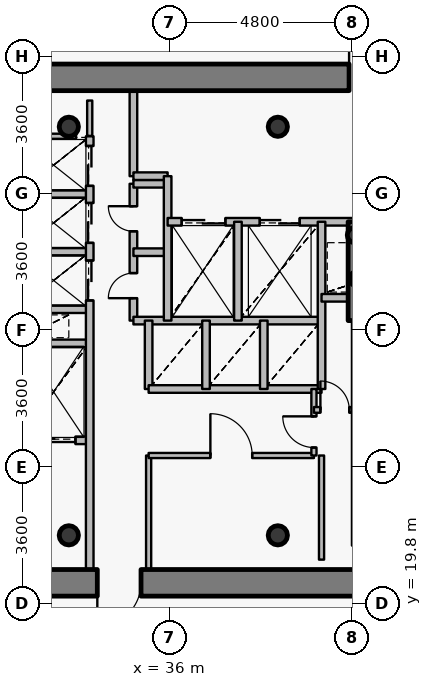
"""IFC4 building model, lengths in metres.
Left out: names, types, materials, properties, quantities, classifications, styles, units other than length and angle.
Written with IfcOpenShell. Run it as: python <this file> out.ifc"""

import sys

from ifc_helpers import new_model, si_unit, direction, frame, frame_2d, origin, origin_2d, place, context, subcontext, project, spatial, rectangle, hollow_circle, extrude, source, transform, mapped, element, fill, save


model = new_model("IFC4")
c1 = context("Model", 3, precision=1e-05, world=origin(), true_north=direction((0.0, 1.0)))
c2 = subcontext(c1, "Body", "Model", "MODEL_VIEW")
j1 = project(units=[si_unit("LENGTHUNIT", "METRE"), si_unit("PLANEANGLEUNIT", "RADIAN")], contexts=[c1])
p1 = place(None, origin())
s1 = spatial("IfcSite", under=j1, at=p1, CompositionType="ELEMENT")
p2 = place(p1, origin())
s2 = spatial("IfcBuilding", under=s1, at=p2, CompositionType="ELEMENT")
p3 = place(p2, frame((0.0, 0.0, 247.8)))
s3 = spatial("IfcBuildingStorey", under=s2, at=p3, CompositionType="ELEMENT", Elevation=247.8)
for number, where, z_axis, x_axis in (
    (1, (33.35, 21.6, 0.0), (0.0, 0.0, 1.0), (1.0, 0.0, 0.0)),
    (2, (38.85, 21.6, 0.0), (0.0, 0.0, 1.0), (1.0, 0.0, 0.0)),
    (3, (38.85, 32.35, 0.0), (0.0, 0.0, 1.0), (1.0, 0.0, 0.0)),
    (4, (33.35, 32.35, 0.0), (0.0, 0.0, 1.0), (1.0, 0.0, 0.0)),
):
    element("IfcColumn", number, at=place(p3, frame(where, z_axis=z_axis, x_axis=x_axis)), inside=s3, PredefinedType="COLUMN", context=c2, shape_type="SweptSolid", body=[
        extrude(hollow_circle(Radius=0.254, WallThickness=0.02, at=origin_2d()), origin(), (0.0, 0.0, 1.0), 3.75),
    ])
for number, where, z_axis, x_axis in (
    (5, (40.95, 28.35, 0.0), (0.0, 0.0, 1.0), (1.0, 0.0, 0.0)),
    (6, (40.88, 29.5, 0.0), (0.0, 0.0, 1.0), (1.0, 0.0, 0.0)),
):
    element("IfcColumn", number, at=place(p3, frame(where, z_axis=z_axis, x_axis=x_axis)), inside=s3, PredefinedType="COLUMN", context=c2, shape_type="SweptSolid", body=[
        extrude(hollow_circle(Radius=0.203, WallThickness=0.016, at=origin_2d()), origin(), (0.0, 0.0, 1.0), 3.75),
    ])
p4 = place(p3, frame((27.05, 33.65, 0.0), z_axis=(0.0, 0.0, 1.0), x_axis=(1.0, 0.0, 0.0)))
e7 = element("IfcWall", 7, at=p4, inside=s3, PredefinedType="SHEAR", context=c2, shape_type="SweptSolid", body=[
    extrude(rectangle(XDim=17.9, YDim=0.7, at=frame_2d((8.95, 0.0))), origin(), (0.0, 0.0, 1.0), 3.05),
])
p5 = place(p4, frame((13.675, 0.0, 0.0)))
e8 = element("IfcOpeningElement", 8, at=p5, cuts=e7, PredefinedType="OPENING", context=c2, shape_type="SweptSolid", body=[
    extrude(rectangle(XDim=1.15, YDim=2.15, at=origin_2d()), frame((0.575, 0.36, 1.075), z_axis=(0.0, -1.0, 0.0), x_axis=(1.0, 0.0, 0.0)), (0.0, 0.0, 1.0), 0.72),
])
p6 = place(p3, frame((44.95, 20.35, 0.0), z_axis=(0.0, 0.0, 1.0), x_axis=(-1.0, 0.0, 0.0)))
e9 = element("IfcWall", 9, at=p6, inside=s3, PredefinedType="SHEAR", context=c2, shape_type="SweptSolid", body=[
    extrude(rectangle(XDim=17.9, YDim=0.7, at=frame_2d((8.95, 0.0))), origin(), (0.0, 0.0, 1.0), 3.05),
])
p7 = place(p6, frame((9.7, 0.0, 0.0)))
e10 = element("IfcOpeningElement", 10, at=p7, cuts=e9, PredefinedType="OPENING", context=c2, shape_type="SweptSolid", body=[
    extrude(rectangle(XDim=1.15, YDim=2.15, at=origin_2d()), frame((0.575, 0.36, 1.075), z_axis=(0.0, -1.0, 0.0), x_axis=(1.0, 0.0, 0.0)), (0.0, 0.0, 1.0), 0.72),
])
p8 = place(p3, frame((40.9, 27.25, 0.0), z_axis=(0.0, 0.0, 1.0), x_axis=(0.0, 1.0, 0.0)))
e11 = element("IfcWall", 11, at=p8, inside=s3, PredefinedType="SHEAR", context=c2, shape_type="SweptSolid", body=[
    extrude(rectangle(XDim=2.6, YDim=0.4, at=frame_2d((1.3, 0.0))), origin(), (0.0, 0.0, 1.0), 3.1),
])
p9 = place(p3, frame((32.0, 24.1, 0.0), z_axis=(0.0, 0.0, 1.0), x_axis=(1.0, 0.0, 0.0)))
e12 = element("IfcWall", 12, at=p9, inside=s3, PredefinedType="PARTITIONING", context=c2, shape_type="SweptSolid", body=[
    extrude(rectangle(XDim=1.9, YDim=0.2, at=frame_2d((0.95, 0.0))), origin(), (0.0, 0.0, 1.0), 3.085),
])
p10 = place(p9, frame((0.375, 0.0, 0.0)))
e13 = element("IfcOpeningElement", 13, at=p10, cuts=e12, PredefinedType="OPENING", context=c2, shape_type="SweptSolid", body=[
    extrude(rectangle(XDim=1.15, YDim=2.15, at=origin_2d()), frame((0.575, 0.11, 1.075), z_axis=(0.0, -1.0, 0.0), x_axis=(1.0, 0.0, 0.0)), (0.0, 0.0, 1.0), 0.22),
])
for number, where, z_axis, x_axis in (
    (14, (32.0, 26.65, 0.0), (0.0, 0.0, 1.0), (1.0, 0.0, 0.0)),
    (15, (32.0, 27.55, 0.0), (0.0, 0.0, 1.0), (1.0, 0.0, 0.0)),
    (16, (32.0, 29.06, 0.0), (0.0, 0.0, 1.0), (1.0, 0.0, 0.0)),
    (17, (32.0, 30.58, 0.0), (0.0, 0.0, 1.0), (1.0, 0.0, 0.0)),
):
    element("IfcWall", number, at=place(p3, frame(where, z_axis=z_axis, x_axis=x_axis)), inside=s3, PredefinedType="PARTITIONING", context=c2, shape_type="SweptSolid", body=[
        extrude(rectangle(XDim=1.9, YDim=0.2, at=frame_2d((0.95, 0.0))), origin(), (0.0, 0.0, 1.0), 3.085),
    ])
p11 = place(p3, frame((33.9, 20.7, 0.0), z_axis=(0.0, 0.0, 1.0), x_axis=(0.0, 1.0, 0.0)))
e18 = element("IfcWall", 18, at=p11, inside=s3, PredefinedType="PARTITIONING", context=c2, shape_type="SweptSolid", body=[
    extrude(rectangle(XDim=11.4, YDim=0.2, at=frame_2d((5.7, 0.0))), origin(), (0.0, 0.0, 1.0), 3.085),
])
p12 = place(p11, frame((7.08, 0.0, 0.0)))
e19 = element("IfcOpeningElement", 19, at=p12, cuts=e18, PredefinedType="OPENING", context=c2, shape_type="SweptSolid", body=[
    extrude(rectangle(XDim=1.05, YDim=2.15, at=origin_2d()), frame((0.525, 0.11, 1.075), z_axis=(0.0, -1.0, 0.0), x_axis=(1.0, 0.0, 0.0)), (0.0, 0.0, 1.0), 0.22),
])
p13 = place(p11, frame((8.595, 0.0, 0.0)))
e20 = element("IfcOpeningElement", 20, at=p13, cuts=e18, PredefinedType="OPENING", context=c2, shape_type="SweptSolid", body=[
    extrude(rectangle(XDim=1.05, YDim=2.15, at=origin_2d()), frame((0.525, 0.11, 1.075), z_axis=(0.0, -1.0, 0.0), x_axis=(1.0, 0.0, 0.0)), (0.0, 0.0, 1.0), 0.22),
])
p14 = place(p11, frame((10.095, 0.0, 0.0)))
e21 = element("IfcOpeningElement", 21, at=p14, cuts=e18, PredefinedType="OPENING", context=c2, shape_type="SweptSolid", body=[
    extrude(rectangle(XDim=1.05, YDim=2.15, at=origin_2d()), frame((0.525, 0.11, 1.075), z_axis=(0.0, -1.0, 0.0), x_axis=(1.0, 0.0, 0.0)), (0.0, 0.0, 1.0), 0.22),
])
p15 = place(p3, frame((35.05, 27.25, 0.0), z_axis=(0.0, 0.0, 1.0), x_axis=(0.0, 1.0, 0.0)))
e22 = element("IfcWall", 22, at=p15, inside=s3, PredefinedType="PARTITIONING", context=c2, shape_type="SweptSolid", body=[
    extrude(rectangle(XDim=3.6, YDim=0.2, at=frame_2d((1.8, 0.0))), origin(), (0.0, 0.0, 1.0), 3.5),
])
p16 = place(p15, frame((0.59, 0.0, 0.0)))
e23 = element("IfcOpeningElement", 23, at=p16, cuts=e22, PredefinedType="OPENING", context=c2, shape_type="SweptSolid", body=[
    extrude(rectangle(XDim=0.66, YDim=2.05, at=origin_2d()), frame((0.33, 0.11, 1.025), z_axis=(0.0, -1.0, 0.0), x_axis=(1.0, 0.0, 0.0)), (0.0, 0.0, 1.0), 0.22),
])
p17 = place(p15, frame((2.35, 0.0, 0.0)))
e24 = element("IfcOpeningElement", 24, at=p17, cuts=e22, PredefinedType="OPENING", context=c2, shape_type="SweptSolid", body=[
    extrude(rectangle(XDim=0.66, YDim=2.05, at=origin_2d()), frame((0.33, 0.11, 1.025), z_axis=(0.0, -1.0, 0.0), x_axis=(1.0, 0.0, 0.0)), (0.0, 0.0, 1.0), 0.22),
])
p18 = place(p3, frame((35.05, 27.25, 0.0), z_axis=(0.0, 0.0, 1.0), x_axis=(1.0, 0.0, 0.0)))
e25 = element("IfcWall", 25, at=p18, inside=s3, PredefinedType="PARTITIONING", context=c2, shape_type="SweptSolid", body=[
    extrude(rectangle(XDim=4.95, YDim=0.2, at=frame_2d((2.475, 0.0))), origin(), (0.0, 0.0, 1.0), 3.085),
])
for number, where, z_axis, x_axis in (
    (26, (35.05, 29.05, 0.0), (0.0, 0.0, 1.0), (1.0, 0.0, 0.0)),
    (27, (35.05, 30.85, 0.0), (0.0, 0.0, 1.0), (1.0, 0.0, 0.0)),
):
    element("IfcWall", number, at=place(p3, frame(where, z_axis=z_axis, x_axis=x_axis)), inside=s3, PredefinedType="PARTITIONING", context=c2, shape_type="SweptSolid", body=[
        extrude(rectangle(XDim=0.9, YDim=0.2, at=frame_2d((0.45, 0.0))), origin(), (0.0, 0.0, 1.0), 3.5),
    ])
p19 = place(p3, frame((35.05, 31.05, 0.0), z_axis=(0.0, 0.0, 1.0), x_axis=(0.0, 1.0, 0.0)))
e28 = element("IfcWall", 28, at=p19, inside=s3, PredefinedType="PARTITIONING", context=c2, shape_type="SweptSolid", body=[
    extrude(rectangle(XDim=2.25, YDim=0.2, at=frame_2d((1.125, 0.0))), origin(), (0.0, 0.0, 1.0), 3.085),
])
p20 = place(p3, frame((35.05, 31.05, 0.0), z_axis=(0.0, 0.0, 1.0), x_axis=(1.0, 0.0, 0.0)))
e29 = element("IfcWall", 29, at=p20, inside=s3, PredefinedType="PARTITIONING", context=c2, shape_type="SweptSolid", body=[
    extrude(rectangle(XDim=0.9, YDim=0.2, at=frame_2d((0.45, 0.0))), origin(), (0.0, 0.0, 1.0), 3.5),
])
p21 = place(p3, frame((35.45, 20.7, 0.0), z_axis=(0.0, 0.0, 1.0), x_axis=(0.0, 1.0, 0.0)))
e30 = element("IfcWall", 30, at=p21, inside=s3, PredefinedType="PARTITIONING", context=c2, shape_type="SweptSolid", body=[
    extrude(rectangle(XDim=3.0, YDim=0.135, at=frame_2d((1.5, 0.0))), origin(), (0.0, 0.0, 1.0), 3.085),
])
p22 = place(p3, frame((35.45, 23.7, 0.0), z_axis=(0.0, 0.0, 1.0), x_axis=(1.0, 0.0, 0.0)))
e31 = element("IfcWall", 31, at=p22, inside=s3, PredefinedType="PARTITIONING", context=c2, shape_type="SweptSolid", body=[
    extrude(rectangle(XDim=4.35, YDim=0.135, at=frame_2d((2.175, 0.0))), origin(), (0.0, 0.0, 1.0), 3.085),
])
p23 = place(p22, frame((1.625, 0.0, 0.0)))
e32 = element("IfcOpeningElement", 32, at=p23, cuts=e31, PredefinedType="OPENING", context=c2, shape_type="SweptSolid", body=[
    extrude(rectangle(XDim=1.1, YDim=2.15, at=origin_2d()), frame((0.55, 0.078, 1.075), z_axis=(0.0, -1.0, 0.0), x_axis=(1.0, 0.0, 0.0)), (0.0, 0.0, 1.0), 0.155),
])
p24 = place(p3, frame((35.45, 25.45, 0.0), z_axis=(0.0, 0.0, 1.0), x_axis=(0.0, 1.0, 0.0)))
e33 = element("IfcWall", 33, at=p24, inside=s3, PredefinedType="PARTITIONING", context=c2, shape_type="SweptSolid", body=[
    extrude(rectangle(XDim=1.8, YDim=0.2, at=frame_2d((0.9, 0.0))), origin(), (0.0, 0.0, 1.0), 3.5),
])
p25 = place(p3, frame((35.45, 25.45, 0.0), z_axis=(0.0, 0.0, 1.0), x_axis=(1.0, 0.0, 0.0)))
e34 = element("IfcWall", 34, at=p25, inside=s3, PredefinedType="PARTITIONING", context=c2, shape_type="SweptSolid", body=[
    extrude(rectangle(XDim=4.55, YDim=0.2, at=frame_2d((2.275, 0.0))), origin(), (0.0, 0.0, 1.0), 3.085),
])
p26 = place(p3, frame((35.95, 27.25, 0.0), z_axis=(0.0, 0.0, 1.0), x_axis=(0.0, 1.0, 0.0)))
e35 = element("IfcWall", 35, at=p26, inside=s3, PredefinedType="PARTITIONING", context=c2, shape_type="SweptSolid", body=[
    extrude(rectangle(XDim=3.8, YDim=0.2, at=frame_2d((1.9, 0.0))), origin(), (0.0, 0.0, 1.0), 3.5),
])
p27 = place(p3, frame((35.95, 29.85, 0.0), z_axis=(0.0, 0.0, 1.0), x_axis=(1.0, 0.0, 0.0)))
e36 = element("IfcWall", 36, at=p27, inside=s3, PredefinedType="PARTITIONING", context=c2, shape_type="SweptSolid", body=[
    extrude(rectangle(XDim=8.49, YDim=0.2, at=frame_2d((4.245, 0.0))), origin(), (0.0, 0.0, 1.0), 3.085),
])
p28 = place(p27, frame((6.1, 0.0, 0.0)))
e37 = element("IfcOpeningElement", 37, at=p28, cuts=e36, PredefinedType="OPENING", context=c2, shape_type="SweptSolid", body=[
    extrude(rectangle(XDim=1.2, YDim=2.15, at=origin_2d()), frame((0.6, 0.11, 1.075), z_axis=(0.0, -1.0, 0.0), x_axis=(1.0, 0.0, 0.0)), (0.0, 0.0, 1.0), 0.22),
])
p29 = place(p27, frame((0.37, 0.0, 0.0)))
e38 = element("IfcOpeningElement", 38, at=p29, cuts=e36, PredefinedType="OPENING", context=c2, shape_type="SweptSolid", body=[
    extrude(rectangle(XDim=1.15, YDim=2.15, at=origin_2d()), frame((0.575, 0.11, 1.075), z_axis=(0.0, -1.0, 0.0), x_axis=(1.0, 0.0, 0.0)), (0.0, 0.0, 1.0), 0.22),
])
p30 = place(p27, frame((2.425, 0.0, 0.0)))
e39 = element("IfcOpeningElement", 39, at=p30, cuts=e36, PredefinedType="OPENING", context=c2, shape_type="SweptSolid", body=[
    extrude(rectangle(XDim=1.05, YDim=2.15, at=origin_2d()), frame((0.525, 0.11, 1.075), z_axis=(0.0, -1.0, 0.0), x_axis=(1.0, 0.0, 0.0)), (0.0, 0.0, 1.0), 0.22),
])
p31 = place(p3, frame((36.96, 25.45, 0.0), z_axis=(0.0, 0.0, 1.0), x_axis=(0.0, 1.0, 0.0)))
e40 = element("IfcWall", 40, at=p31, inside=s3, PredefinedType="PARTITIONING", context=c2, shape_type="SweptSolid", body=[
    extrude(rectangle(XDim=1.8, YDim=0.2, at=frame_2d((0.9, 0.0))), origin(), (0.0, 0.0, 1.0), 3.5),
])
p32 = place(p3, frame((37.8, 27.25, 0.0), z_axis=(0.0, 0.0, 1.0), x_axis=(0.0, 1.0, 0.0)))
e41 = element("IfcWall", 41, at=p32, inside=s3, PredefinedType="PARTITIONING", context=c2, shape_type="SweptSolid", body=[
    extrude(rectangle(XDim=2.6, YDim=0.2, at=frame_2d((1.3, 0.0))), origin(), (0.0, 0.0, 1.0), 3.5),
])
p33 = place(p3, frame((38.48, 25.45, 0.0), z_axis=(0.0, 0.0, 1.0), x_axis=(0.0, 1.0, 0.0)))
e42 = element("IfcWall", 42, at=p33, inside=s3, PredefinedType="PARTITIONING", context=c2, shape_type="SweptSolid", body=[
    extrude(rectangle(XDim=1.8, YDim=0.2, at=frame_2d((0.9, 0.0))), origin(), (0.0, 0.0, 1.0), 3.5),
])
p34 = place(p3, frame((39.8, 23.7, 0.0), z_axis=(0.0, 0.0, 1.0), x_axis=(0.0, 1.0, 0.0)))
e43 = element("IfcWall", 43, at=p34, inside=s3, PredefinedType="PARTITIONING", context=c2, shape_type="SweptSolid", body=[
    extrude(rectangle(XDim=1.75, YDim=0.135, at=frame_2d((0.875, 0.0))), origin(), (0.0, 0.0, 1.0), 3.5),
])
p35 = place(p34, frame((0.21, 0.0, 0.0)))
e44 = element("IfcOpeningElement", 44, at=p35, cuts=e43, PredefinedType="OPENING", context=c2, shape_type="SweptSolid", body=[
    extrude(rectangle(XDim=0.82, YDim=2.1, at=origin_2d()), frame((0.41, 0.078, 1.05), z_axis=(0.0, -1.0, 0.0), x_axis=(1.0, 0.0, 0.0)), (0.0, 0.0, 1.0), 0.155),
])
p36 = place(p3, frame((39.8, 24.9, 0.0), z_axis=(0.0, 0.0, 1.0), x_axis=(1.0, 0.0, 0.0)))
e45 = element("IfcWall", 45, at=p36, inside=s3, PredefinedType="PARTITIONING", context=c2, shape_type="SweptSolid", body=[
    extrude(rectangle(XDim=1.1, YDim=0.15, at=frame_2d((0.55, 0.0))), origin(), (0.0, 0.0, 1.0), 3.5),
])
p37 = place(p36, frame((0.17, 0.0, 0.0)))
e46 = element("IfcOpeningElement", 46, at=p37, cuts=e45, PredefinedType="OPENING", context=c2, shape_type="SweptSolid", body=[
    extrude(rectangle(XDim=0.76, YDim=2.1, at=origin_2d()), frame((0.38, 0.085, 1.05), z_axis=(0.0, -1.0, 0.0), x_axis=(1.0, 0.0, 0.0)), (0.0, 0.0, 1.0), 0.17),
])
p38 = place(p3, frame((40.0, 25.45, 0.0), z_axis=(0.0, 0.0, 1.0), x_axis=(0.0, 1.0, 0.0)))
e47 = element("IfcWall", 47, at=p38, inside=s3, PredefinedType="PARTITIONING", context=c2, shape_type="SweptSolid", body=[
    extrude(rectangle(XDim=4.4, YDim=0.2, at=frame_2d((2.2, 0.0))), origin(), (0.0, 0.0, 1.0), 3.5),
])
p39 = place(p3, frame((40.0, 27.85, 0.0), z_axis=(0.0, 0.0, 1.0), x_axis=(1.0, 0.0, 0.0)))
e48 = element("IfcWall", 48, at=p39, inside=s3, PredefinedType="PARTITIONING", context=c2, shape_type="SweptSolid", body=[
    extrude(rectangle(XDim=0.9, YDim=0.2, at=frame_2d((0.45, 0.0))), origin(), (0.0, 0.0, 1.0), 3.5),
])
p40 = place(p3, frame((40.9, 21.33, 0.0), z_axis=(0.0, 0.0, 1.0), x_axis=(0.0, 1.0, 0.0)))
e49 = element("IfcWall", 49, at=p40, inside=s3, PredefinedType="PARTITIONING", context=c2, shape_type="SweptSolid", body=[
    extrude(rectangle(XDim=5.91, YDim=0.2, at=frame_2d((2.955, 0.0))), origin(), (0.0, 0.0, 1.0), 3.035),
])
p41 = place(p3, frame((32.36, 32.1, 0.0), z_axis=(0.0, 0.0, 1.0), x_axis=(1.0, 0.0, 0.0)))
e50 = element("IfcWall", 50, at=p41, inside=s3, PredefinedType="PARTITIONING", context=c2, shape_type="SweptSolid", body=[
    extrude(rectangle(XDim=1.18, YDim=0.135, at=frame_2d((0.59, 0.0))), origin(), (0.0, 0.0, 1.0), 3.085),
])
p42 = place(p3, frame((40.0, 23.7, 0.0), z_axis=(0.0, 0.0, 1.0), x_axis=(0.0, -1.0, 0.0)))
e51 = element("IfcWall", 51, at=p42, inside=s3, PredefinedType="PARTITIONING", context=c2, shape_type="SweptSolid", body=[
    extrude(rectangle(XDim=2.74, YDim=0.135, at=frame_2d((1.37, 0.0))), origin(), (0.0, 0.0, 1.0), 3.035),
])
p43 = place(p3, frame((33.9, 32.11, 0.0), z_axis=(0.0, 0.0, 1.0), x_axis=(0.0, 1.0, 0.0)))
e52 = element("IfcWall", 52, at=p43, inside=s3, PredefinedType="PARTITIONING", context=c2, shape_type="SweptSolid", body=[
    extrude(rectangle(XDim=0.93, YDim=0.135, at=frame_2d((0.465, 0.0))), origin(), (0.0, 0.0, 1.0), 3.085),
])
m1 = source(origin(), c2, "Body", "SweptSolid", [
    extrude(rectangle(XDim=1.15, YDim=2.15, at=origin_2d()), frame((0.575, 0.025, 1.075), z_axis=(0.0, -1.0, 0.0), x_axis=(1.0, 0.0, 0.0)), (0.0, 0.0, 1.0), 0.05),
])
p44 = place(p5, origin())
e53 = element("IfcDoor", 53, at=p44, inside=s3, OperationType="SINGLE_SWING_LEFT", PredefinedType="DOOR", context=c2, shape_type="MappedRepresentation", body=[
    mapped(m1, transform((0.0, 0.0, 0.0), x_axis=(1.0, 0.0, 0.0), y_axis=(0.0, 1.0, 0.0), z_axis=(0.0, 0.0, 1.0), scale=1.0)),
])
fill(e8, e53)
p45 = place(p7, origin())
e54 = element("IfcDoor", 54, at=p45, inside=s3, OperationType="SINGLE_SWING_RIGHT", PredefinedType="DOOR", context=c2, shape_type="MappedRepresentation", body=[
    mapped(m1, transform((0.0, 0.0, 0.0), x_axis=(1.0, 0.0, 0.0), y_axis=(0.0, 1.0, 0.0), z_axis=(0.0, 0.0, 1.0), scale=1.0)),
])
fill(e10, e54)
m2 = source(origin(), c2, "Body", "SweptSolid", [
    extrude(rectangle(XDim=1.15, YDim=2.15, at=origin_2d()), frame((0.575, 0.025, 1.075), z_axis=(0.0, -1.0, 0.0), x_axis=(1.0, 0.0, 0.0)), (0.0, 0.0, 1.0), 0.05),
])
p46 = place(p29, origin())
e55 = element("IfcDoor", 55, at=p46, inside=s3, OperationType="DOUBLE_DOOR_SLIDING", PredefinedType="USERDEFINED", context=c2, shape_type="MappedRepresentation", body=[
    mapped(m2, transform((0.0, 0.0, 0.0), x_axis=(1.0, 0.0, 0.0), y_axis=(0.0, 1.0, 0.0), z_axis=(0.0, 0.0, 1.0), scale=1.0)),
])
fill(e38, e55)
p47 = place(p10, origin())
e56 = element("IfcDoor", 56, at=p47, inside=s3, OperationType="DOUBLE_DOOR_SLIDING", PredefinedType="USERDEFINED", context=c2, shape_type="MappedRepresentation", body=[
    mapped(m2, transform((0.0, 0.0, 0.0), x_axis=(1.0, 0.0, 0.0), y_axis=(0.0, 1.0, 0.0), z_axis=(0.0, 0.0, 1.0), scale=1.0)),
])
fill(e13, e56)
m3 = source(origin(), c2, "Body", "SweptSolid", [
    extrude(rectangle(XDim=1.05, YDim=2.15, at=origin_2d()), frame((0.525, 0.025, 1.075), z_axis=(0.0, -1.0, 0.0), x_axis=(1.0, 0.0, 0.0)), (0.0, 0.0, 1.0), 0.05),
])
p48 = place(p30, origin())
e57 = element("IfcDoor", 57, at=p48, inside=s3, OperationType="DOUBLE_DOOR_SLIDING", PredefinedType="USERDEFINED", context=c2, shape_type="MappedRepresentation", body=[
    mapped(m3, transform((0.0, 0.0, 0.0), x_axis=(1.0, 0.0, 0.0), y_axis=(0.0, 1.0, 0.0), z_axis=(0.0, 0.0, 1.0), scale=1.0)),
])
fill(e39, e57)
p49 = place(p12, origin())
e58 = element("IfcDoor", 58, at=p49, inside=s3, OperationType="DOUBLE_DOOR_SLIDING", PredefinedType="USERDEFINED", context=c2, shape_type="MappedRepresentation", body=[
    mapped(m3, transform((0.0, 0.0, 0.0), x_axis=(1.0, 0.0, 0.0), y_axis=(0.0, 1.0, 0.0), z_axis=(0.0, 0.0, 1.0), scale=1.0)),
])
fill(e19, e58)
p50 = place(p13, origin())
e59 = element("IfcDoor", 59, at=p50, inside=s3, OperationType="DOUBLE_DOOR_SLIDING", PredefinedType="USERDEFINED", context=c2, shape_type="MappedRepresentation", body=[
    mapped(m3, transform((0.0, 0.0, 0.0), x_axis=(1.0, 0.0, 0.0), y_axis=(0.0, 1.0, 0.0), z_axis=(0.0, 0.0, 1.0), scale=1.0)),
])
fill(e20, e59)
p51 = place(p14, origin())
e60 = element("IfcDoor", 60, at=p51, inside=s3, OperationType="DOUBLE_DOOR_SLIDING", PredefinedType="USERDEFINED", context=c2, shape_type="MappedRepresentation", body=[
    mapped(m3, transform((0.0, 0.0, 0.0), x_axis=(1.0, 0.0, 0.0), y_axis=(0.0, 1.0, 0.0), z_axis=(0.0, 0.0, 1.0), scale=1.0)),
])
fill(e21, e60)
m4 = source(origin(), c2, "Body", "SweptSolid", [
    extrude(rectangle(XDim=0.66, YDim=2.05, at=origin_2d()), frame((0.33, 0.025, 1.025), z_axis=(0.0, -1.0, 0.0), x_axis=(1.0, 0.0, 0.0)), (0.0, 0.0, 1.0), 0.05),
])
p52 = place(p16, origin())
e61 = element("IfcDoor", 61, at=p52, inside=s3, OperationType="SINGLE_SWING_LEFT", PredefinedType="USERDEFINED", context=c2, shape_type="MappedRepresentation", body=[
    mapped(m4, transform((0.0, 0.0, 0.0), x_axis=(1.0, 0.0, 0.0), y_axis=(0.0, 1.0, 0.0), z_axis=(0.0, 0.0, 1.0), scale=1.0)),
])
fill(e23, e61)
p53 = place(p17, origin())
e62 = element("IfcDoor", 62, at=p53, inside=s3, OperationType="SINGLE_SWING_RIGHT", PredefinedType="USERDEFINED", context=c2, shape_type="MappedRepresentation", body=[
    mapped(m4, transform((0.0, 0.0, 0.0), x_axis=(1.0, 0.0, 0.0), y_axis=(0.0, 1.0, 0.0), z_axis=(0.0, 0.0, 1.0), scale=1.0)),
])
fill(e24, e62)
m5 = source(origin(), c2, "Body", "SweptSolid", [
    extrude(rectangle(XDim=1.1, YDim=2.15, at=origin_2d()), frame((0.55, 0.025, 1.075), z_axis=(0.0, -1.0, 0.0), x_axis=(1.0, 0.0, 0.0)), (0.0, 0.0, 1.0), 0.05),
])
p54 = place(p23, origin())
e63 = element("IfcDoor", 63, at=p54, inside=s3, OperationType="SINGLE_SWING_LEFT", PredefinedType="DOOR", context=c2, shape_type="MappedRepresentation", body=[
    mapped(m5, transform((0.0, 0.0, 0.0), x_axis=(1.0, 0.0, 0.0), y_axis=(0.0, 1.0, 0.0), z_axis=(0.0, 0.0, 1.0), scale=1.0)),
])
fill(e32, e63)
m6 = source(origin(), c2, "Body", "SweptSolid", [
    extrude(rectangle(XDim=0.82, YDim=2.1, at=origin_2d()), frame((0.41, 0.025, 1.05), z_axis=(0.0, -1.0, 0.0), x_axis=(1.0, 0.0, 0.0)), (0.0, 0.0, 1.0), 0.05),
])
p55 = place(p35, origin())
e64 = element("IfcDoor", 64, at=p55, inside=s3, OperationType="SINGLE_SWING_RIGHT", PredefinedType="DOOR", context=c2, shape_type="MappedRepresentation", body=[
    mapped(m6, transform((0.0, 0.0, 0.0), x_axis=(1.0, 0.0, 0.0), y_axis=(0.0, 1.0, 0.0), z_axis=(0.0, 0.0, 1.0), scale=1.0)),
])
fill(e44, e64)
m7 = source(origin(), c2, "Body", "SweptSolid", [
    extrude(rectangle(XDim=0.76, YDim=2.1, at=origin_2d()), frame((0.38, 0.025, 1.05), z_axis=(0.0, -1.0, 0.0), x_axis=(1.0, 0.0, 0.0)), (0.0, 0.0, 1.0), 0.05),
])
p56 = place(p37, origin())
e65 = element("IfcDoor", 65, at=p56, inside=s3, OperationType="SINGLE_SWING_LEFT", PredefinedType="DOOR", context=c2, shape_type="MappedRepresentation", body=[
    mapped(m7, transform((0.0, 0.0, 0.0), x_axis=(1.0, 0.0, 0.0), y_axis=(0.0, 1.0, 0.0), z_axis=(0.0, 0.0, 1.0), scale=1.0)),
])
fill(e46, e65)
save(model, sys.argv[1])
